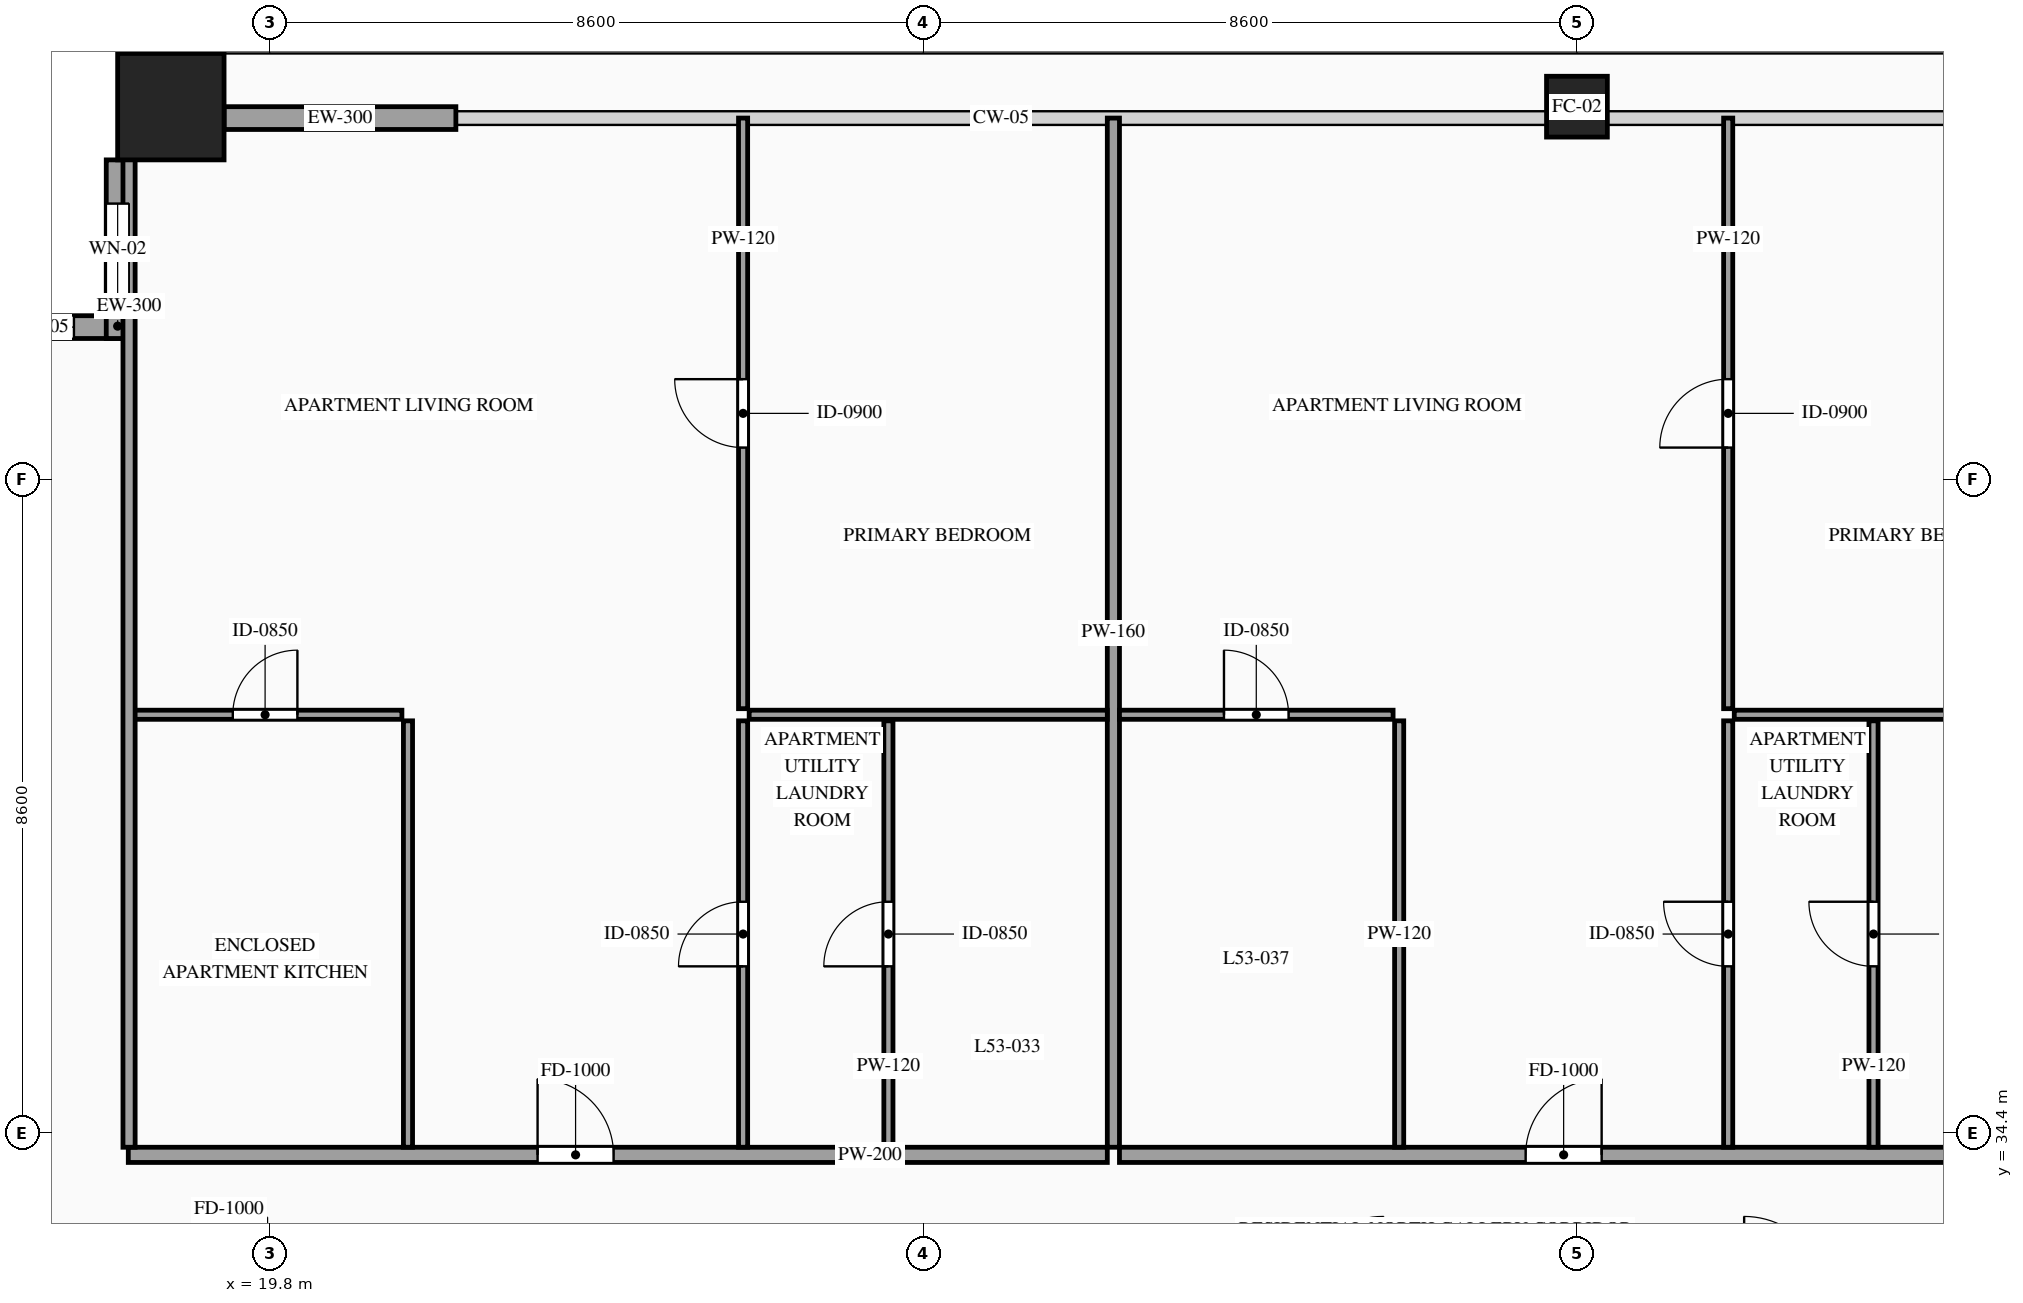
"""IFC4 building model, lengths in metres.
Left out: names, types, materials, properties, quantities, classifications, styles, units other than length and angle.
Written with IfcOpenShell. Run it as: python <this file> out.ifc"""

import sys

from ifc_helpers import new_model, si_unit, direction, frame, frame_2d, origin, origin_2d, place, context, subcontext, project, spatial, rectangle, hollow_rectangle, extrude, source, transform, mapped, element, fill, save


model = new_model("IFC4")
c1 = context("Model", 3, precision=1e-05, world=origin(), true_north=direction((0.0, 1.0)))
c2 = subcontext(c1, "Body", "Model", "MODEL_VIEW")
j1 = project(units=[si_unit("LENGTHUNIT", "METRE"), si_unit("PLANEANGLEUNIT", "RADIAN")], contexts=[c1])
p1 = place(None, origin())
s1 = spatial("IfcSite", under=j1, at=p1, CompositionType="ELEMENT")
p2 = place(p1, origin())
s2 = spatial("IfcBuilding", under=s1, at=p2, CompositionType="ELEMENT")
p3 = place(p2, frame((0.0, 0.0, 202.0)))
s3 = spatial("IfcBuildingStorey", under=s2, at=p3, CompositionType="ELEMENT", Elevation=202.0)
m1 = source(origin(), c2, "Body", "SweptSolid", [
    extrude(hollow_rectangle(XDim=1.4, YDim=1.4, WallThickness=0.06, at=origin_2d()), origin(), (0.0, 0.0, 1.0), 3.5),
])
p4 = place(p3, frame((18.5, 47.9, 0.0), z_axis=(0.0, 0.0, 1.0), x_axis=(1.0, 0.0, 0.0)))
e1 = element("IfcColumn", 1, at=p4, inside=s3, PredefinedType="COLUMN", context=c2, shape_type="MappedRepresentation", body=[
    mapped(m1, transform((0.0, 0.0, 0.0), scale=1.0)),
])
m2 = source(origin(), c2, "Body", "SweptSolid", [
    extrude(hollow_rectangle(XDim=0.8, YDim=0.8, WallThickness=0.036, at=origin_2d()), origin(), (0.0, 0.0, 1.0), 3.5),
])
p5 = place(p3, frame((37.0, 47.9, 0.0), z_axis=(0.0, 0.0, 1.0), x_axis=(1.0, 0.0, 0.0)))
e2 = element("IfcColumn", 2, at=p5, inside=s3, PredefinedType="COLUMN", context=c2, shape_type="MappedRepresentation", body=[
    mapped(m2, transform((0.0, 0.0, 0.0), scale=1.0)),
])
p6 = place(p3, frame((17.95, 45.0, 0.0), z_axis=(0.0, 0.0, 1.0), x_axis=(-1.0, 0.0, 0.0)))
e3 = element("IfcWall", 3, at=p6, inside=s3, PredefinedType="SOLIDWALL", context=c2, shape_type="SweptSolid", body=[
    extrude(rectangle(XDim=2.35, YDim=0.3, at=frame_2d((1.175, 0.0))), origin(), (0.0, 0.0, 1.0), 3.28),
])
p7 = place(p6, frame((0.725, 0.0, 0.85)))
e4 = element("IfcOpeningElement", 4, at=p7, cuts=e3, PredefinedType="OPENING", context=c2, shape_type="SweptSolid", body=[
    extrude(rectangle(XDim=0.9, YDim=1.5, at=frame_2d((0.45, 0.75))), frame((0.0, 0.165, 0.0), z_axis=(0.0, -1.0, 0.0), x_axis=(1.0, 0.0, 0.0)), (0.0, 0.0, 1.0), 0.33),
])
p8 = place(p3, frame((17.8, 47.2, 0.0), z_axis=(0.0, 0.0, 1.0), x_axis=(0.0, -1.0, 0.0)))
e5 = element("IfcWall", 5, at=p8, inside=s3, PredefinedType="SOLIDWALL", context=c2, shape_type="SweptSolid", body=[
    extrude(rectangle(XDim=2.35, YDim=0.3, at=frame_2d((1.175, 0.0))), origin(), (0.0, 0.0, 1.0), 3.28),
])
p9 = place(p8, frame((0.575, 0.0, 0.85)))
e6 = element("IfcOpeningElement", 6, at=p9, cuts=e5, PredefinedType="OPENING", context=c2, shape_type="SweptSolid", body=[
    extrude(rectangle(XDim=1.2, YDim=2.1, at=frame_2d((0.6, 1.05))), frame((0.0, 0.165, 0.0), z_axis=(0.0, -1.0, 0.0), x_axis=(1.0, 0.0, 0.0)), (0.0, 0.0, 1.0), 0.33),
])
m3 = source(origin(), c2, "Body", "SweptSolid", [
    extrude(rectangle(XDim=3.05, YDim=0.3, at=frame_2d((1.525, 0.0))), origin(), (0.0, 0.0, 1.0), 2.835),
])
p10 = place(p3, frame((19.2, 47.75, 0.0), z_axis=(0.0, 0.0, 1.0), x_axis=(1.0, 0.0, 0.0)))
e7 = element("IfcWall", 7, at=p10, inside=s3, PredefinedType="SOLIDWALL", context=c2, shape_type="MappedRepresentation", body=[
    mapped(m3, transform((0.0, 0.0, 0.0), scale=1.0)),
])
p11 = place(p3, frame((17.94, 34.11, 0.0), z_axis=(0.0, 0.0, 1.0), x_axis=(1.0, 0.0, 0.0)))
e8 = element("IfcWall", 8, at=p11, inside=s3, PredefinedType="PARTITIONING", context=c2, shape_type="SweptSolid", body=[
    extrude(rectangle(XDim=12.881, YDim=0.2, at=frame_2d((6.44, 0.0))), origin(), (0.0, 0.0, 1.0), 3.28),
])
p12 = place(p11, frame((5.385, 0.0, 0.0)))
e9 = element("IfcOpeningElement", 9, at=p12, cuts=e8, PredefinedType="OPENING", context=c2, shape_type="SweptSolid", body=[
    extrude(rectangle(XDim=1.0, YDim=2.2, at=frame_2d((0.5, 1.1))), frame((0.0, 0.115, 0.0), z_axis=(0.0, -1.0, 0.0), x_axis=(1.0, 0.0, 0.0)), (0.0, 0.0, 1.0), 0.23),
])
m4 = source(origin(), c2, "Body", "SweptSolid", [
    extrude(rectangle(XDim=13.54, YDim=0.16, at=frame_2d((6.77, 0.0))), origin(), (0.0, 0.0, 1.0), 3.28),
])
p13 = place(p3, frame((30.901, 34.21, 0.0), z_axis=(0.0, 0.0, 1.0), x_axis=(0.0, 1.0, 0.0)))
e10 = element("IfcWall", 10, at=p13, inside=s3, PredefinedType="PARTITIONING", context=c2, shape_type="MappedRepresentation", body=[
    mapped(m4, transform((0.0, 0.0, 0.0), scale=1.0)),
])
p14 = place(p3, frame((17.94, 39.9, 0.0), z_axis=(0.0, 0.0, 1.0), x_axis=(1.0, 0.0, 0.0)))
e11 = element("IfcWall", 11, at=p14, inside=s3, PredefinedType="PARTITIONING", context=c2, shape_type="SweptSolid", body=[
    extrude(rectangle(XDim=3.6, YDim=0.12, at=frame_2d((1.8, 0.0))), origin(), (0.0, 0.0, 1.0), 3.28),
])
p15 = place(p14, frame((1.375, 0.0, 0.0)))
e12 = element("IfcOpeningElement", 12, at=p15, cuts=e11, PredefinedType="OPENING", context=c2, shape_type="SweptSolid", body=[
    extrude(rectangle(XDim=0.85, YDim=2.1, at=frame_2d((0.425, 1.05))), frame((0.0, 0.075, 0.0), z_axis=(0.0, -1.0, 0.0), x_axis=(1.0, 0.0, 0.0)), (0.0, 0.0, 1.0), 0.15),
])
m5 = source(origin(), c2, "Body", "SweptSolid", [
    extrude(rectangle(XDim=5.61, YDim=0.12, at=frame_2d((2.805, 0.0))), origin(), (0.0, 0.0, 1.0), 3.28),
])
p16 = place(p3, frame((21.62, 34.21, 0.0), z_axis=(0.0, 0.0, 1.0), x_axis=(0.0, 1.0, 0.0)))
e13 = element("IfcWall", 13, at=p16, inside=s3, PredefinedType="PARTITIONING", context=c2, shape_type="MappedRepresentation", body=[
    mapped(m5, transform((0.0, 0.0, 0.0), scale=1.0)),
])
p17 = place(p3, frame((27.941, 34.21, 0.0), z_axis=(0.0, 0.0, 1.0), x_axis=(0.0, 1.0, 0.0)))
e14 = element("IfcWall", 14, at=p17, inside=s3, PredefinedType="PARTITIONING", context=c2, shape_type="SweptSolid", body=[
    extrude(rectangle(XDim=5.61, YDim=0.12, at=frame_2d((2.805, 0.0))), origin(), (0.0, 0.0, 1.0), 3.28),
])
p18 = place(p17, frame((2.38, 0.0, 0.0)))
e15 = element("IfcOpeningElement", 15, at=p18, cuts=e14, PredefinedType="OPENING", context=c2, shape_type="SweptSolid", body=[
    extrude(rectangle(XDim=0.85, YDim=2.1, at=frame_2d((0.425, 1.05))), frame((0.0, 0.075, 0.0), z_axis=(0.0, -1.0, 0.0), x_axis=(1.0, 0.0, 0.0)), (0.0, 0.0, 1.0), 0.15),
])
m6 = source(origin(), c2, "Body", "SweptSolid", [
    extrude(rectangle(XDim=4.712, YDim=0.12, at=frame_2d((2.356, 0.0))), origin(), (0.0, 0.0, 1.0), 2.875),
])
p19 = place(p3, frame((26.109, 39.9, 0.0), z_axis=(0.0, 0.0, 1.0), x_axis=(1.0, 0.0, 0.0)))
e16 = element("IfcWall", 16, at=p19, inside=s3, PredefinedType="PARTITIONING", context=c2, shape_type="MappedRepresentation", body=[
    mapped(m6, transform((0.0, 0.0, 0.0), scale=1.0)),
])
p20 = place(p3, frame((26.029, 39.98, 0.0), z_axis=(0.0, 0.0, 1.0), x_axis=(0.0, 1.0, 0.0)))
e17 = element("IfcWall", 17, at=p20, inside=s3, PredefinedType="PARTITIONING", context=c2, shape_type="SweptSolid", body=[
    extrude(rectangle(XDim=7.77, YDim=0.12, at=frame_2d((3.885, 0.0))), origin(), (0.0, 0.0, 1.0), 3.28),
])
p21 = place(p20, frame((3.435, 0.0, 0.0)))
e18 = element("IfcOpeningElement", 18, at=p21, cuts=e17, PredefinedType="OPENING", context=c2, shape_type="SweptSolid", body=[
    extrude(rectangle(XDim=0.9, YDim=2.15, at=frame_2d((0.45, 1.075))), frame((0.0, 0.075, 0.0), z_axis=(0.0, -1.0, 0.0), x_axis=(1.0, 0.0, 0.0)), (0.0, 0.0, 1.0), 0.15),
])
p22 = place(p3, frame((26.029, 34.21, 0.0), z_axis=(0.0, 0.0, 1.0), x_axis=(0.0, 1.0, 0.0)))
e19 = element("IfcWall", 19, at=p22, inside=s3, PredefinedType="PARTITIONING", context=c2, shape_type="SweptSolid", body=[
    extrude(rectangle(XDim=5.61, YDim=0.12, at=frame_2d((2.805, 0.0))), origin(), (0.0, 0.0, 1.0), 3.28),
])
p23 = place(p22, frame((2.38, 0.0, 0.0)))
e20 = element("IfcOpeningElement", 20, at=p23, cuts=e19, PredefinedType="OPENING", context=c2, shape_type="SweptSolid", body=[
    extrude(rectangle(XDim=0.85, YDim=2.1, at=frame_2d((0.425, 1.05))), frame((0.0, 0.075, 0.0), z_axis=(0.0, -1.0, 0.0), x_axis=(1.0, 0.0, 0.0)), (0.0, 0.0, 1.0), 0.15),
])
p24 = place(p3, frame((30.981, 34.11, 0.0), z_axis=(0.0, 0.0, 1.0), x_axis=(1.0, 0.0, 0.0)))
e21 = element("IfcWall", 21, at=p24, inside=s3, PredefinedType="PARTITIONING", context=c2, shape_type="SweptSolid", body=[
    extrude(rectangle(XDim=12.801, YDim=0.2, at=frame_2d((6.4, 0.0))), origin(), (0.0, 0.0, 1.0), 3.28),
])
p25 = place(p24, frame((5.344, 0.0, 0.0)))
e22 = element("IfcOpeningElement", 22, at=p25, cuts=e21, PredefinedType="OPENING", context=c2, shape_type="SweptSolid", body=[
    extrude(rectangle(XDim=1.0, YDim=2.2, at=frame_2d((0.5, 1.1))), frame((0.0, 0.115, 0.0), z_axis=(0.0, -1.0, 0.0), x_axis=(1.0, 0.0, 0.0)), (0.0, 0.0, 1.0), 0.23),
])
p26 = place(p3, frame((30.981, 39.9, 0.0), z_axis=(0.0, 0.0, 1.0), x_axis=(1.0, 0.0, 0.0)))
e23 = element("IfcWall", 23, at=p26, inside=s3, PredefinedType="PARTITIONING", context=c2, shape_type="SweptSolid", body=[
    extrude(rectangle(XDim=3.6, YDim=0.12, at=frame_2d((1.8, 0.0))), origin(), (0.0, 0.0, 1.0), 2.875),
])
p27 = place(p26, frame((1.375, 0.0, 0.0)))
e24 = element("IfcOpeningElement", 24, at=p27, cuts=e23, PredefinedType="OPENING", context=c2, shape_type="SweptSolid", body=[
    extrude(rectangle(XDim=0.85, YDim=2.1, at=frame_2d((0.425, 1.05))), frame((0.0, 0.075, 0.0), z_axis=(0.0, -1.0, 0.0), x_axis=(1.0, 0.0, 0.0)), (0.0, 0.0, 1.0), 0.15),
])
p28 = place(p3, frame((34.661, 34.21, 0.0), z_axis=(0.0, 0.0, 1.0), x_axis=(0.0, 1.0, 0.0)))
e25 = element("IfcWall", 25, at=p28, inside=s3, PredefinedType="PARTITIONING", context=c2, shape_type="MappedRepresentation", body=[
    mapped(m5, transform((0.0, 0.0, 0.0), scale=1.0)),
])
p29 = place(p3, frame((40.902, 34.21, 0.0), z_axis=(0.0, 0.0, 1.0), x_axis=(0.0, 1.0, 0.0)))
e26 = element("IfcWall", 26, at=p29, inside=s3, PredefinedType="PARTITIONING", context=c2, shape_type="SweptSolid", body=[
    extrude(rectangle(XDim=5.61, YDim=0.12, at=frame_2d((2.805, 0.0))), origin(), (0.0, 0.0, 1.0), 3.28),
])
p30 = place(p29, frame((2.38, 0.0, 0.0)))
e27 = element("IfcOpeningElement", 27, at=p30, cuts=e26, PredefinedType="OPENING", context=c2, shape_type="SweptSolid", body=[
    extrude(rectangle(XDim=0.85, YDim=2.1, at=frame_2d((0.425, 1.05))), frame((0.0, 0.075, 0.0), z_axis=(0.0, -1.0, 0.0), x_axis=(1.0, 0.0, 0.0)), (0.0, 0.0, 1.0), 0.15),
])
m7 = source(origin(), c2, "Body", "SweptSolid", [
    extrude(rectangle(XDim=4.712, YDim=0.12, at=frame_2d((2.356, 0.0))), origin(), (0.0, 0.0, 1.0), 2.875),
])
p31 = place(p3, frame((39.07, 39.9, 0.0), z_axis=(0.0, 0.0, 1.0), x_axis=(1.0, 0.0, 0.0)))
e28 = element("IfcWall", 28, at=p31, inside=s3, PredefinedType="PARTITIONING", context=c2, shape_type="MappedRepresentation", body=[
    mapped(m7, transform((0.0, 0.0, 0.0), scale=1.0)),
])
p32 = place(p3, frame((38.99, 39.98, 0.0), z_axis=(0.0, 0.0, 1.0), x_axis=(0.0, 1.0, 0.0)))
e29 = element("IfcWall", 29, at=p32, inside=s3, PredefinedType="PARTITIONING", context=c2, shape_type="SweptSolid", body=[
    extrude(rectangle(XDim=7.77, YDim=0.12, at=frame_2d((3.885, 0.0))), origin(), (0.0, 0.0, 1.0), 3.28),
])
p33 = place(p32, frame((3.435, 0.0, 0.0)))
e30 = element("IfcOpeningElement", 30, at=p33, cuts=e29, PredefinedType="OPENING", context=c2, shape_type="SweptSolid", body=[
    extrude(rectangle(XDim=0.9, YDim=2.15, at=frame_2d((0.45, 1.075))), frame((0.0, 0.075, 0.0), z_axis=(0.0, -1.0, 0.0), x_axis=(1.0, 0.0, 0.0)), (0.0, 0.0, 1.0), 0.15),
])
p34 = place(p3, frame((38.99, 34.21, 0.0), z_axis=(0.0, 0.0, 1.0), x_axis=(0.0, 1.0, 0.0)))
e31 = element("IfcWall", 31, at=p34, inside=s3, PredefinedType="PARTITIONING", context=c2, shape_type="SweptSolid", body=[
    extrude(rectangle(XDim=5.61, YDim=0.12, at=frame_2d((2.805, 0.0))), origin(), (0.0, 0.0, 1.0), 3.28),
])
p35 = place(p34, frame((2.38, 0.0, 0.0)))
e32 = element("IfcOpeningElement", 32, at=p35, cuts=e31, PredefinedType="OPENING", context=c2, shape_type="SweptSolid", body=[
    extrude(rectangle(XDim=0.85, YDim=2.1, at=frame_2d((0.425, 1.05))), frame((0.0, 0.075, 0.0), z_axis=(0.0, -1.0, 0.0), x_axis=(1.0, 0.0, 0.0)), (0.0, 0.0, 1.0), 0.15),
])
m8 = source(origin(), c2, "Body", "SweptSolid", [
    extrude(rectangle(XDim=13.39, YDim=0.16, at=frame_2d((6.695, 0.0))), origin(), (0.0, 0.0, 1.0), 3.28),
])
p36 = place(p3, frame((17.95, 34.21, 0.0), z_axis=(0.0, 0.0, 1.0), x_axis=(0.0, 1.0, 0.0)))
e33 = element("IfcWall", 33, at=p36, inside=s3, PredefinedType="PARTITIONING", context=c2, shape_type="MappedRepresentation", body=[
    mapped(m8, transform((0.0, 0.0, 0.0), scale=1.0)),
])
m9 = source(origin(), c2, "Body", "SweptSolid", [
    extrude(rectangle(XDim=0.9, YDim=1.5, at=frame_2d((0.45, 0.75))), frame((0.0, 0.03, 0.0), z_axis=(0.0, -1.0, 0.0), x_axis=(1.0, 0.0, 0.0)), (0.0, 0.0, 1.0), 0.06),
])
p37 = place(p7, origin())
e34 = element("IfcWindow", 34, at=p37, inside=s3, PartitioningType="SINGLE_PANEL", PredefinedType="WINDOW", context=c2, shape_type="MappedRepresentation", body=[
    mapped(m9, transform((0.0, 0.0, 0.0), scale=1.0)),
])
fill(e4, e34)
m10 = source(origin(), c2, "Body", "SweptSolid", [
    extrude(rectangle(XDim=1.2, YDim=2.1, at=frame_2d((0.6, 1.05))), frame((0.0, 0.03, 0.0), z_axis=(0.0, -1.0, 0.0), x_axis=(1.0, 0.0, 0.0)), (0.0, 0.0, 1.0), 0.06),
])
p38 = place(p9, origin())
e35 = element("IfcWindow", 35, at=p38, inside=s3, PartitioningType="SINGLE_PANEL", PredefinedType="WINDOW", context=c2, shape_type="MappedRepresentation", body=[
    mapped(m10, transform((0.0, 0.0, 0.0), scale=1.0)),
])
fill(e6, e35)
m11 = source(origin(), c2, "Body", "SweptSolid", [
    extrude(rectangle(XDim=1.0, YDim=2.2, at=frame_2d((0.5, 1.1))), frame((0.0, 0.025, 0.0), z_axis=(0.0, -1.0, 0.0), x_axis=(1.0, 0.0, 0.0)), (0.0, 0.0, 1.0), 0.05),
])
p39 = place(p12, origin())
e36 = element("IfcDoor", 36, at=p39, inside=s3, OperationType="SINGLE_SWING_LEFT", PredefinedType="DOOR", context=c2, shape_type="MappedRepresentation", body=[
    mapped(m11, transform((0.0, 0.0, 0.0), scale=1.0)),
])
fill(e9, e36)
m12 = source(origin(), c2, "Body", "SweptSolid", [
    extrude(rectangle(XDim=0.85, YDim=2.1, at=frame_2d((0.425, 1.05))), frame((0.0, 0.025, 0.0), z_axis=(0.0, -1.0, 0.0), x_axis=(1.0, 0.0, 0.0)), (0.0, 0.0, 1.0), 0.05),
])
p40 = place(p15, origin())
e37 = element("IfcDoor", 37, at=p40, inside=s3, OperationType="SINGLE_SWING_RIGHT", PredefinedType="DOOR", context=c2, shape_type="MappedRepresentation", body=[
    mapped(m12, transform((0.0, 0.0, 0.0), scale=1.0)),
])
fill(e12, e37)
p41 = place(p18, origin())
e38 = element("IfcDoor", 38, at=p41, inside=s3, OperationType="SINGLE_SWING_LEFT", PredefinedType="DOOR", context=c2, shape_type="MappedRepresentation", body=[
    mapped(m12, transform((0.0, 0.0, 0.0), scale=1.0)),
])
fill(e15, e38)
m13 = source(origin(), c2, "Body", "SweptSolid", [
    extrude(rectangle(XDim=0.9, YDim=2.15, at=frame_2d((0.45, 1.075))), frame((0.0, 0.025, 0.0), z_axis=(0.0, -1.0, 0.0), x_axis=(1.0, 0.0, 0.0)), (0.0, 0.0, 1.0), 0.05),
])
p42 = place(p21, origin())
e39 = element("IfcDoor", 39, at=p42, inside=s3, OperationType="SINGLE_SWING_RIGHT", PredefinedType="DOOR", context=c2, shape_type="MappedRepresentation", body=[
    mapped(m13, transform((0.0, 0.0, 0.0), scale=1.0)),
])
fill(e18, e39)
p43 = place(p23, origin())
e40 = element("IfcDoor", 40, at=p43, inside=s3, OperationType="SINGLE_SWING_LEFT", PredefinedType="DOOR", context=c2, shape_type="MappedRepresentation", body=[
    mapped(m12, transform((0.0, 0.0, 0.0), scale=1.0)),
])
fill(e20, e40)
p44 = place(p25, origin())
e41 = element("IfcDoor", 41, at=p44, inside=s3, OperationType="SINGLE_SWING_RIGHT", PredefinedType="DOOR", context=c2, shape_type="MappedRepresentation", body=[
    mapped(m11, transform((0.0, 0.0, 0.0), scale=1.0)),
])
fill(e22, e41)
p45 = place(p27, origin())
e42 = element("IfcDoor", 42, at=p45, inside=s3, OperationType="SINGLE_SWING_LEFT", PredefinedType="DOOR", context=c2, shape_type="MappedRepresentation", body=[
    mapped(m12, transform((0.0, 0.0, 0.0), scale=1.0)),
])
fill(e24, e42)
p46 = place(p30, origin())
e43 = element("IfcDoor", 43, at=p46, inside=s3, OperationType="SINGLE_SWING_RIGHT", PredefinedType="DOOR", context=c2, shape_type="MappedRepresentation", body=[
    mapped(m12, transform((0.0, 0.0, 0.0), scale=1.0)),
])
fill(e27, e43)
p47 = place(p33, origin())
e44 = element("IfcDoor", 44, at=p47, inside=s3, OperationType="SINGLE_SWING_LEFT", PredefinedType="DOOR", context=c2, shape_type="MappedRepresentation", body=[
    mapped(m13, transform((0.0, 0.0, 0.0), scale=1.0)),
])
fill(e30, e44)
p48 = place(p35, origin())
e45 = element("IfcDoor", 45, at=p48, inside=s3, OperationType="SINGLE_SWING_RIGHT", PredefinedType="DOOR", context=c2, shape_type="MappedRepresentation", body=[
    mapped(m12, transform((0.0, 0.0, 0.0), scale=1.0)),
])
fill(e32, e45)
save(model, sys.argv[1])
